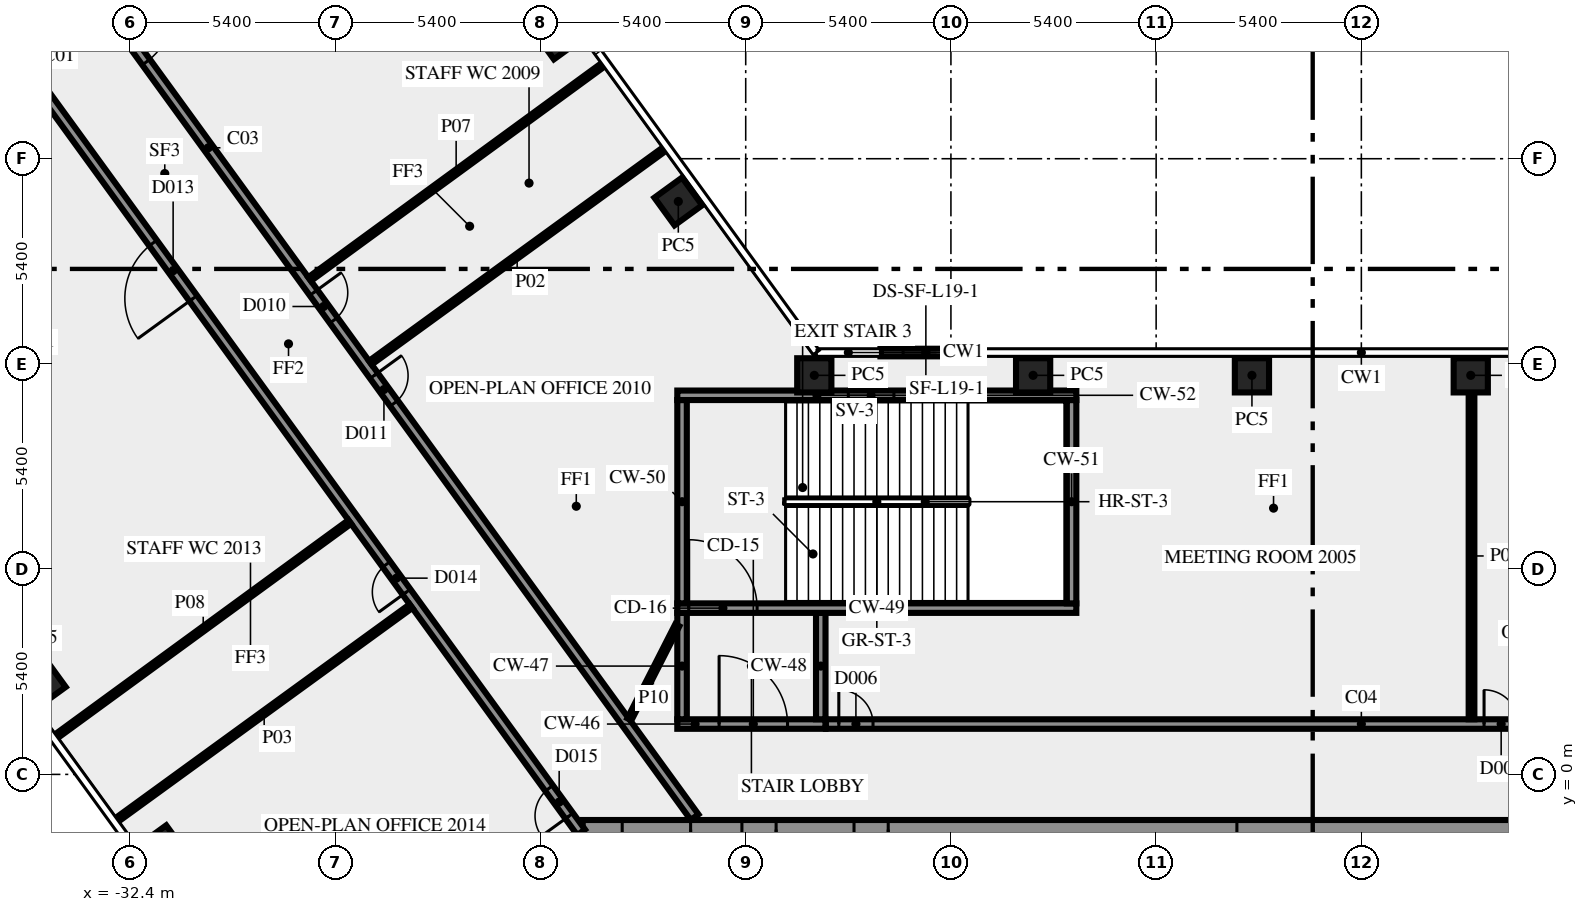
"""IFC4 building model, lengths in metres.
Left out: names, types, materials, properties, quantities, classifications, styles, units other than length and angle.
Written with IfcOpenShell. Run it as: python <this file> out.ifc"""

import sys

from ifc_helpers import new_model, si_unit, direction, frame, frame_2d, origin, origin_2d, place, context, subcontext, project, spatial, rectangle, extrude, element, fill, save


model = new_model("IFC4")
c1 = context("Model", 3, precision=1e-05, world=origin(), true_north=direction((0.0, 1.0)))
c2 = subcontext(c1, "Body", "Model", "MODEL_VIEW")
j1 = project(units=[si_unit("LENGTHUNIT", "METRE"), si_unit("PLANEANGLEUNIT", "RADIAN")], contexts=[c1])
p1 = place(None, origin())
s1 = spatial("IfcSite", under=j1, at=p1, CompositionType="ELEMENT")
p2 = place(p1, origin())
s2 = spatial("IfcBuilding", under=s1, at=p2, CompositionType="ELEMENT")
p3 = place(p2, frame((0.0, 0.0, 89.0)))
s3 = spatial("IfcBuildingStorey", under=s2, at=p3, CompositionType="ELEMENT", Elevation=89.0)
for number, where, z_axis, x_axis in (
    (1, (-17.974, 15.075, 0.0), (0.0, 0.0, 1.0), (-0.588, 0.809, 0.0)),
    (2, (-21.147, 19.444, 0.0), (0.0, 0.0, 1.0), (-0.588, 0.809, 0.0)),
    (3, (-34.722, 2.4, 0.0), (0.0, 0.0, 1.0), (0.588, -0.809, 0.0)),
    (4, (-31.548, -1.969, 0.0), (0.0, 0.0, 1.0), (0.588, -0.809, 0.0)),
    (5, (2.879, 10.5, 0.0), (0.0, 0.0, 1.0), (-1.0, 0.0, 0.0)),
    (6, (-2.879, 10.5, 0.0), (0.0, 0.0, 1.0), (-1.0, 0.0, 0.0)),
    (7, (-8.637, 10.5, 0.0), (0.0, 0.0, 1.0), (-1.0, 0.0, 0.0)),
    (8, (-14.395, 10.5, 0.0), (0.0, 0.0, 1.0), (-1.0, 0.0, 0.0)),
):
    element("IfcColumn", number, at=place(p3, frame(where, z_axis=z_axis, x_axis=x_axis)), inside=s3, PredefinedType="COLUMN", context=c2, shape_type="SweptSolid", body=[
        extrude(rectangle(XDim=0.9, YDim=0.9, at=origin_2d()), origin(), (0.0, 0.0, 1.0), 3.65),
    ])
p4 = place(p3, frame((-10.263, 11.1, 0.0), z_axis=(0.0, 0.0, 1.0), x_axis=(-1.0, 0.0, 0.0)))
e9 = element("IfcWall", 9, at=p4, inside=s3, PredefinedType="SOLIDWALL", context=c2, shape_type="SweptSolid", body=[
    extrude(rectangle(XDim=2.392, YDim=0.2, at=frame_2d((1.196, 0.0))), origin(), (0.0, 0.0, 1.0), 3.65),
])
p5 = place(p4, frame((0.596, 0.0, 1.0)))
e10 = element("IfcOpeningElement", 10, at=p5, cuts=e9, PredefinedType="OPENING", context=c2, shape_type="SweptSolid", body=[
    extrude(rectangle(XDim=1.2, YDim=1.2, at=frame_2d((0.6, 0.6))), frame((0.0, 0.11, 0.0), z_axis=(0.0, -1.0, 0.0), x_axis=(1.0, 0.0, 0.0)), (0.0, 0.0, 1.0), 0.22),
])
p6 = place(p3, frame((20.49, -1.45, 0.0), z_axis=(0.0, 0.0, 1.0), x_axis=(-1.0, 0.0, 0.0)))
e11 = element("IfcWall", 11, at=p6, inside=s3, PredefinedType="SHEAR", context=c2, shape_type="SweptSolid", body=[
    extrude(rectangle(XDim=40.98, YDim=0.5, at=frame_2d((20.49, 0.0))), origin(), (0.0, 0.0, 1.0), 3.65),
])
p7 = place(p6, frame((38.14, 0.0, 0.0)))
e12 = element("IfcOpeningElement", 12, at=p7, cuts=e11, PredefinedType="OPENING", context=c2, shape_type="SweptSolid", body=[
    extrude(rectangle(XDim=1.8, YDim=2.1, at=frame_2d((0.9, 1.05))), frame((0.0, 0.26, 0.0), z_axis=(0.0, -1.0, 0.0), x_axis=(1.0, 0.0, 0.0)), (0.0, 0.0, 1.0), 0.52),
])
p8 = place(p6, frame((35.89, 0.0, 0.0)))
e13 = element("IfcOpeningElement", 13, at=p8, cuts=e11, PredefinedType="OPENING", context=c2, shape_type="SweptSolid", body=[
    extrude(rectangle(XDim=0.9, YDim=2.1, at=frame_2d((0.45, 1.05))), frame((0.0, 0.26, 0.0), z_axis=(0.0, -1.0, 0.0), x_axis=(1.0, 0.0, 0.0)), (0.0, 0.0, 1.0), 0.52),
])
p9 = place(p6, frame((32.94, 0.0, 0.0)))
e14 = element("IfcOpeningElement", 14, at=p9, cuts=e11, PredefinedType="OPENING", context=c2, shape_type="SweptSolid", body=[
    extrude(rectangle(XDim=0.9, YDim=2.1, at=frame_2d((0.45, 1.05))), frame((0.0, 0.26, 0.0), z_axis=(0.0, -1.0, 0.0), x_axis=(1.0, 0.0, 0.0)), (0.0, 0.0, 1.0), 0.52),
])
p10 = place(p6, frame((21.765, 0.0, 0.0)))
e15 = element("IfcOpeningElement", 15, at=p10, cuts=e11, PredefinedType="OPENING", context=c2, shape_type="SweptSolid", body=[
    extrude(rectangle(XDim=2.0, YDim=2.1, at=frame_2d((1.0, 1.05))), frame((0.0, 0.26, 0.0), z_axis=(0.0, -1.0, 0.0), x_axis=(1.0, 0.0, 0.0)), (0.0, 0.0, 1.0), 0.52),
])
p11 = place(p6, frame((7.14, 0.0, 0.0)))
e16 = element("IfcOpeningElement", 16, at=p11, cuts=e11, PredefinedType="OPENING", context=c2, shape_type="SweptSolid", body=[
    extrude(rectangle(XDim=0.9, YDim=2.1, at=frame_2d((0.45, 1.05))), frame((0.0, 0.26, 0.0), z_axis=(0.0, -1.0, 0.0), x_axis=(1.0, 0.0, 0.0)), (0.0, 0.0, 1.0), 0.52),
])
p12 = place(p6, frame((5.028, 0.0, 0.0)))
e17 = element("IfcOpeningElement", 17, at=p12, cuts=e11, PredefinedType="OPENING", context=c2, shape_type="SweptSolid", body=[
    extrude(rectangle(XDim=0.8, YDim=2.1, at=frame_2d((0.4, 1.05))), frame((0.0, 0.26, 0.0), z_axis=(0.0, -1.0, 0.0), x_axis=(1.0, 0.0, 0.0)), (0.0, 0.0, 1.0), 0.52),
])
p13 = place(p6, frame((3.452, 0.0, 0.0)))
e18 = element("IfcOpeningElement", 18, at=p13, cuts=e11, PredefinedType="OPENING", context=c2, shape_type="SweptSolid", body=[
    extrude(rectangle(XDim=0.8, YDim=2.1, at=frame_2d((0.4, 1.05))), frame((0.0, 0.26, 0.0), z_axis=(0.0, -1.0, 0.0), x_axis=(1.0, 0.0, 0.0)), (0.0, 0.0, 1.0), 0.52),
])
p14 = place(p6, frame((1.04, 0.0, 0.0)))
e19 = element("IfcOpeningElement", 19, at=p14, cuts=e11, PredefinedType="OPENING", context=c2, shape_type="SweptSolid", body=[
    extrude(rectangle(XDim=1.8, YDim=2.1, at=frame_2d((0.9, 1.05))), frame((0.0, 0.26, 0.0), z_axis=(0.0, -1.0, 0.0), x_axis=(1.0, 0.0, 0.0)), (0.0, 0.0, 1.0), 0.52),
])
p15 = place(p3, frame((-18.0, 1.325, 0.0), z_axis=(0.0, 0.0, 1.0), x_axis=(1.0, 0.0, 0.0)))
e20 = element("IfcWall", 20, at=p15, inside=s3, PredefinedType="SHEAR", context=c2, shape_type="SweptSolid", body=[
    extrude(rectangle(XDim=3.9, YDim=0.25, at=frame_2d((1.95, 0.0))), origin(), (0.0, 0.0, 1.0), 3.65),
])
p16 = place(p15, frame((1.1, 0.0, 0.0)))
e21 = element("IfcOpeningElement", 21, at=p16, cuts=e20, PredefinedType="OPENING", context=c2, shape_type="SweptSolid", body=[
    extrude(rectangle(XDim=1.8, YDim=2.1, at=frame_2d((0.9, 1.05))), frame((0.0, 0.135, 0.0), z_axis=(0.0, -1.0, 0.0), x_axis=(1.0, 0.0, 0.0)), (0.0, 0.0, 1.0), 0.27),
])
for number, where, z_axis, x_axis in (
    (22, (-17.875, 1.45, 0.0), (0.0, 0.0, 1.0), (0.0, 1.0, 0.0)),
    (23, (-14.225, 1.45, 0.0), (0.0, 0.0, 1.0), (0.0, 1.0, 0.0)),
):
    element("IfcWall", number, at=place(p3, frame(where, z_axis=z_axis, x_axis=x_axis)), inside=s3, PredefinedType="SHEAR", context=c2, shape_type="SweptSolid", body=[
        extrude(rectangle(XDim=2.8, YDim=0.25, at=frame_2d((1.4, 0.0))), origin(), (0.0, 0.0, 1.0), 3.65),
    ])
p17 = place(p3, frame((-18.0, 4.375, 0.0), z_axis=(0.0, 0.0, 1.0), x_axis=(1.0, 0.0, 0.0)))
e24 = element("IfcWall", 24, at=p17, inside=s3, PredefinedType="SHEAR", context=c2, shape_type="SweptSolid", body=[
    extrude(rectangle(XDim=10.5, YDim=0.25, at=frame_2d((5.25, 0.0))), origin(), (0.0, 0.0, 1.0), 3.65),
])
p18 = place(p17, frame((0.3, 0.0, 0.0)))
e25 = element("IfcOpeningElement", 25, at=p18, cuts=e24, PredefinedType="OPENING", context=c2, shape_type="SweptSolid", body=[
    extrude(rectangle(XDim=1.8, YDim=2.1, at=frame_2d((0.9, 1.05))), frame((0.0, 0.135, 0.0), z_axis=(0.0, -1.0, 0.0), x_axis=(1.0, 0.0, 0.0)), (0.0, 0.0, 1.0), 0.27),
])
for number, where, z_axis, x_axis in (
    (26, (-17.875, 4.5, 0.0), (0.0, 0.0, 1.0), (0.0, 1.0, 0.0)),
    (27, (-7.625, 4.5, 0.0), (0.0, 0.0, 1.0), (0.0, 1.0, 0.0)),
):
    element("IfcWall", number, at=place(p3, frame(where, z_axis=z_axis, x_axis=x_axis)), inside=s3, PredefinedType="SHEAR", context=c2, shape_type="SweptSolid", body=[
        extrude(rectangle(XDim=5.35, YDim=0.25, at=frame_2d((2.675, 0.0))), origin(), (0.0, 0.0, 1.0), 3.65),
    ])
p19 = place(p3, frame((-18.0, 9.975, 0.0), z_axis=(0.0, 0.0, 1.0), x_axis=(1.0, 0.0, 0.0)))
e28 = element("IfcWall", 28, at=p19, inside=s3, PredefinedType="SHEAR", context=c2, shape_type="SweptSolid", body=[
    extrude(rectangle(XDim=10.5, YDim=0.25, at=frame_2d((5.25, 0.0))), origin(), (0.0, 0.0, 1.0), 3.65),
])
p20 = place(p19, frame((4.5, 0.0, 1.0)))
e29 = element("IfcOpeningElement", 29, at=p20, cuts=e28, PredefinedType="OPENING", context=c2, shape_type="SweptSolid", body=[
    extrude(rectangle(XDim=1.2, YDim=1.2, at=frame_2d((0.6, 0.6))), frame((0.0, 0.135, 0.0), z_axis=(0.0, -1.0, 0.0), x_axis=(1.0, 0.0, 0.0)), (0.0, 0.0, 1.0), 0.27),
])
p21 = place(p3, frame((-20.531, -1.523, 0.0), z_axis=(0.0, 0.0, 1.0), x_axis=(-0.587784522481, 0.809017524614, 0.0)))
e30 = element("IfcWall", 30, at=p21, inside=s3, PredefinedType="SOLIDWALL", context=c2, shape_type="SweptSolid", body=[
    extrude(rectangle(XDim=49.912, YDim=0.25, at=frame_2d((24.956, 0.0))), origin(), (0.0, 0.0, 1.0), 3.65),
])
p22 = place(p21, frame((0.533, 0.0, 0.0)))
e31 = element("IfcOpeningElement", 31, at=p22, cuts=e30, PredefinedType="OPENING", context=c2, shape_type="SweptSolid", body=[
    extrude(rectangle(XDim=0.9, YDim=2.1, at=frame_2d((0.45, 1.05))), frame((0.0, 0.135, 0.0), z_axis=(0.0, -1.0, 0.0), x_axis=(1.0, 0.0, 0.0)), (0.0, 0.0, 1.0), 0.27),
])
p23 = place(p21, frame((48.47, 0.0, 0.0)))
e32 = element("IfcOpeningElement", 32, at=p23, cuts=e30, PredefinedType="OPENING", context=c2, shape_type="SweptSolid", body=[
    extrude(rectangle(XDim=1.0, YDim=2.1, at=frame_2d((0.5, 1.05))), frame((0.0, 0.135, 0.0), z_axis=(0.0, -1.0, 0.0), x_axis=(1.0, 0.0, 0.0)), (0.0, 0.0, 1.0), 0.27),
])
p24 = place(p21, frame((17.365, 0.0, 0.0)))
e33 = element("IfcOpeningElement", 33, at=p24, cuts=e30, PredefinedType="OPENING", context=c2, shape_type="SweptSolid", body=[
    extrude(rectangle(XDim=1.8, YDim=2.1, at=frame_2d((0.9, 1.05))), frame((0.0, 0.135, 0.0), z_axis=(0.0, -1.0, 0.0), x_axis=(1.0, 0.0, 0.0)), (0.0, 0.0, 1.0), 0.27),
])
p25 = place(p21, frame((7.816, 0.0, 0.0)))
e34 = element("IfcOpeningElement", 34, at=p25, cuts=e30, PredefinedType="OPENING", context=c2, shape_type="SweptSolid", body=[
    extrude(rectangle(XDim=0.9, YDim=2.1, at=frame_2d((0.45, 1.05))), frame((0.0, 0.135, 0.0), z_axis=(0.0, -1.0, 0.0), x_axis=(1.0, 0.0, 0.0)), (0.0, 0.0, 1.0), 0.27),
])
p26 = place(p3, frame((-37.232, 25.972, 0.0), z_axis=(0.0, 0.0, 1.0), x_axis=(0.587786323093, -0.809016216391, 0.0)))
e35 = element("IfcWall", 35, at=p26, inside=s3, PredefinedType="SOLIDWALL", context=c2, shape_type="SweptSolid", body=[
    extrude(rectangle(XDim=33.493, YDim=0.25, at=frame_2d((16.747, 0.0))), origin(), (0.0, 0.0, 1.0), 3.65),
])
p27 = place(p26, frame((19.135, 0.0, 0.0)))
e36 = element("IfcOpeningElement", 36, at=p27, cuts=e35, PredefinedType="OPENING", context=c2, shape_type="SweptSolid", body=[
    extrude(rectangle(XDim=0.9, YDim=2.1, at=frame_2d((0.45, 1.05))), frame((0.0, 0.135, 0.0), z_axis=(0.0, -1.0, 0.0), x_axis=(1.0, 0.0, 0.0)), (0.0, 0.0, 1.0), 0.27),
])
p28 = place(p26, frame((7.137, 0.0, 0.0)))
e37 = element("IfcOpeningElement", 37, at=p28, cuts=e35, PredefinedType="OPENING", context=c2, shape_type="SweptSolid", body=[
    extrude(rectangle(XDim=1.8, YDim=2.1, at=frame_2d((0.9, 1.05))), frame((0.0, 0.135, 0.0), z_axis=(0.0, -1.0, 0.0), x_axis=(1.0, 0.0, 0.0)), (0.0, 0.0, 1.0), 0.27),
])
p29 = place(p26, frame((16.435, 0.0, 0.0)))
e38 = element("IfcOpeningElement", 38, at=p29, cuts=e35, PredefinedType="OPENING", context=c2, shape_type="SweptSolid", body=[
    extrude(rectangle(XDim=0.9, YDim=2.1, at=frame_2d((0.45, 1.05))), frame((0.0, 0.135, 0.0), z_axis=(0.0, -1.0, 0.0), x_axis=(1.0, 0.0, 0.0)), (0.0, 0.0, 1.0), 0.27),
])
p30 = place(p3, frame((-14.09, 1.325, 0.0), z_axis=(0.0, 0.0, 1.0), x_axis=(1.0, 0.0, 0.0)))
e39 = element("IfcWall", 39, at=p30, inside=s3, PredefinedType="SOLIDWALL", context=c2, shape_type="SweptSolid", body=[
    extrude(rectangle(XDim=28.18, YDim=0.25, at=frame_2d((14.09, 0.0))), origin(), (0.0, 0.0, 1.0), 3.65),
])
p31 = place(p30, frame((17.319, 0.0, 0.0)))
e40 = element("IfcOpeningElement", 40, at=p31, cuts=e39, PredefinedType="OPENING", context=c2, shape_type="SweptSolid", body=[
    extrude(rectangle(XDim=0.9, YDim=2.1, at=frame_2d((0.45, 1.05))), frame((0.0, 0.135, 0.0), z_axis=(0.0, -1.0, 0.0), x_axis=(1.0, 0.0, 0.0)), (0.0, 0.0, 1.0), 0.27),
])
p32 = place(p30, frame((0.34, 0.0, 0.0)))
e41 = element("IfcOpeningElement", 41, at=p32, cuts=e39, PredefinedType="OPENING", context=c2, shape_type="SweptSolid", body=[
    extrude(rectangle(XDim=0.9, YDim=2.1, at=frame_2d((0.45, 1.05))), frame((0.0, 0.135, 0.0), z_axis=(0.0, -1.0, 0.0), x_axis=(1.0, 0.0, 0.0)), (0.0, 0.0, 1.0), 0.27),
])
p33 = place(p3, frame((2.899, 10.045, 0.0), z_axis=(0.0, 0.0, 1.0), x_axis=(0.0, -1.0, 0.0)))
e42 = element("IfcWall", 42, at=p33, inside=s3, PredefinedType="PARTITIONING", context=c2, shape_type="SweptSolid", body=[
    extrude(rectangle(XDim=8.595, YDim=0.15, at=frame_2d((4.297, 0.0))), origin(), (0.0, 0.0, 1.0), 3.65),
])
p34 = place(p3, frame((-18.351, 16.445, 0.0), z_axis=(0.0, 0.0, 1.0), x_axis=(-0.809052142986, -0.587736871338, 0.0)))
e43 = element("IfcWall", 43, at=p34, inside=s3, PredefinedType="PARTITIONING", context=c2, shape_type="SweptSolid", body=[
    extrude(rectangle(XDim=9.55, YDim=0.12, at=frame_2d((4.775, 0.0))), origin(), (0.0, 0.0, 1.0), 2.75),
])
p35 = place(p3, frame((-25.008, 4.427, 0.0), z_axis=(0.0, 0.0, 1.0), x_axis=(-0.808994684961, -0.587815957341, 0.0)))
e44 = element("IfcWall", 44, at=p35, inside=s3, PredefinedType="PARTITIONING", context=c2, shape_type="SweptSolid", body=[
    extrude(rectangle(XDim=9.55, YDim=0.12, at=frame_2d((4.775, 0.0))), origin(), (0.0, 0.0, 1.0), 2.75),
])
for number, where, z_axis, x_axis in (
    (45, (-27.676, 13.032, 0.0), (0.0, 0.0, 1.0), (0.808, 0.59, 0.0)),
    (46, (-34.332, 1.011, 0.0), (0.0, 0.0, 1.0), (0.808, 0.59, 0.0)),
):
    element("IfcWall", number, at=place(p3, frame(where, z_axis=z_axis, x_axis=x_axis)), inside=s3, PredefinedType="PARTITIONING", context=c2, shape_type="SweptSolid", body=[
        extrude(rectangle(XDim=9.55, YDim=0.12, at=frame_2d((4.775, 0.0))), origin(), (0.0, 0.0, 1.0), 2.75),
    ])
p36 = place(p3, frame((-19.261, 1.45, 0.0), z_axis=(0.0, 0.0, 1.0), x_axis=(0.453950796792, 0.891026752736, 0.0)))
e47 = element("IfcWall", 47, at=p36, inside=s3, PredefinedType="PARTITIONING", context=c2, shape_type="SweptSolid", body=[
    extrude(rectangle(XDim=2.778, YDim=0.12, at=frame_2d((1.389, 0.0))), origin(), (0.0, 0.0, 1.0), 3.65),
])
p37 = place(p5, origin())
e48 = element("IfcWindow", 48, at=p37, inside=s3, PartitioningType="SINGLE_PANEL", PredefinedType="WINDOW", context=c2, shape_type="SweptSolid", body=[
    extrude(rectangle(XDim=1.2, YDim=1.2, at=frame_2d((0.6, 0.6))), frame((0.0, 0.03, 0.0), z_axis=(0.0, -1.0, 0.0), x_axis=(1.0, 0.0, 0.0)), (0.0, 0.0, 1.0), 0.06),
])
fill(e10, e48)
p38 = place(p7, origin())
e49 = element("IfcDoor", 49, at=p38, inside=s3, OperationType="DOUBLE_DOOR_SINGLE_SWING", PredefinedType="DOOR", context=c2, shape_type="SweptSolid", body=[
    extrude(rectangle(XDim=1.8, YDim=2.1, at=frame_2d((0.9, 1.05))), frame((0.0, 0.025, 0.0), z_axis=(0.0, -1.0, 0.0), x_axis=(1.0, 0.0, 0.0)), (0.0, 0.0, 1.0), 0.05),
])
fill(e12, e49)
p39 = place(p8, origin())
e50 = element("IfcDoor", 50, at=p39, inside=s3, OperationType="SINGLE_SWING_RIGHT", PredefinedType="DOOR", context=c2, shape_type="SweptSolid", body=[
    extrude(rectangle(XDim=0.9, YDim=2.1, at=frame_2d((0.45, 1.05))), frame((0.0, 0.025, 0.0), z_axis=(0.0, -1.0, 0.0), x_axis=(1.0, 0.0, 0.0)), (0.0, 0.0, 1.0), 0.05),
])
fill(e13, e50)
p40 = place(p9, origin())
e51 = element("IfcDoor", 51, at=p40, inside=s3, OperationType="SINGLE_SWING_RIGHT", PredefinedType="DOOR", context=c2, shape_type="SweptSolid", body=[
    extrude(rectangle(XDim=0.9, YDim=2.1, at=frame_2d((0.45, 1.05))), frame((0.0, 0.025, 0.0), z_axis=(0.0, -1.0, 0.0), x_axis=(1.0, 0.0, 0.0)), (0.0, 0.0, 1.0), 0.05),
])
fill(e14, e51)
p41 = place(p10, origin())
e52 = element("IfcDoor", 52, at=p41, inside=s3, OperationType="DOUBLE_DOOR_SINGLE_SWING", PredefinedType="DOOR", context=c2, shape_type="SweptSolid", body=[
    extrude(rectangle(XDim=2.0, YDim=2.1, at=frame_2d((1.0, 1.05))), frame((0.0, 0.025, 0.0), z_axis=(0.0, -1.0, 0.0), x_axis=(1.0, 0.0, 0.0)), (0.0, 0.0, 1.0), 0.05),
])
fill(e15, e52)
p42 = place(p16, origin())
e53 = element("IfcDoor", 53, at=p42, inside=s3, OperationType="DOUBLE_DOOR_SINGLE_SWING", PredefinedType="DOOR", context=c2, shape_type="SweptSolid", body=[
    extrude(rectangle(XDim=1.8, YDim=2.1, at=frame_2d((0.9, 1.05))), frame((0.0, 0.025, 0.0), z_axis=(0.0, -1.0, 0.0), x_axis=(1.0, 0.0, 0.0)), (0.0, 0.0, 1.0), 0.05),
])
fill(e21, e53)
p43 = place(p18, origin())
e54 = element("IfcDoor", 54, at=p43, inside=s3, OperationType="DOUBLE_DOOR_SINGLE_SWING", PredefinedType="DOOR", context=c2, shape_type="SweptSolid", body=[
    extrude(rectangle(XDim=1.8, YDim=2.1, at=frame_2d((0.9, 1.05))), frame((0.0, 0.025, 0.0), z_axis=(0.0, -1.0, 0.0), x_axis=(1.0, 0.0, 0.0)), (0.0, 0.0, 1.0), 0.05),
])
fill(e25, e54)
p44 = place(p20, origin())
e55 = element("IfcWindow", 55, at=p44, inside=s3, PartitioningType="SINGLE_PANEL", PredefinedType="WINDOW", context=c2, shape_type="SweptSolid", body=[
    extrude(rectangle(XDim=1.2, YDim=1.2, at=frame_2d((0.6, 0.6))), frame((0.0, 0.03, 0.0), z_axis=(0.0, -1.0, 0.0), x_axis=(1.0, 0.0, 0.0)), (0.0, 0.0, 1.0), 0.06),
])
fill(e29, e55)
p45 = place(p31, origin())
e56 = element("IfcDoor", 56, at=p45, inside=s3, OperationType="SINGLE_SWING_LEFT", PredefinedType="DOOR", context=c2, shape_type="SweptSolid", body=[
    extrude(rectangle(XDim=0.9, YDim=2.1, at=frame_2d((0.45, 1.05))), frame((0.0, 0.025, 0.0), z_axis=(0.0, -1.0, 0.0), x_axis=(1.0, 0.0, 0.0)), (0.0, 0.0, 1.0), 0.05),
])
fill(e40, e56)
p46 = place(p27, origin())
e57 = element("IfcDoor", 57, at=p46, inside=s3, OperationType="SINGLE_SWING_LEFT", PredefinedType="DOOR", context=c2, shape_type="SweptSolid", body=[
    extrude(rectangle(XDim=0.9, YDim=2.1, at=frame_2d((0.45, 1.05))), frame((0.0, 0.025, 0.0), z_axis=(0.0, -1.0, 0.0), x_axis=(1.0, 0.0, 0.0)), (0.0, 0.0, 1.0), 0.05),
])
fill(e36, e57)
p47 = place(p22, origin())
e58 = element("IfcDoor", 58, at=p47, inside=s3, OperationType="SINGLE_SWING_LEFT", PredefinedType="DOOR", context=c2, shape_type="SweptSolid", body=[
    extrude(rectangle(XDim=0.9, YDim=2.1, at=frame_2d((0.45, 1.05))), frame((0.0, 0.025, 0.0), z_axis=(0.0, -1.0, 0.0), x_axis=(1.0, 0.0, 0.0)), (0.0, 0.0, 1.0), 0.05),
])
fill(e31, e58)
p48 = place(p32, origin())
e59 = element("IfcDoor", 59, at=p48, inside=s3, OperationType="SINGLE_SWING_LEFT", PredefinedType="DOOR", context=c2, shape_type="SweptSolid", body=[
    extrude(rectangle(XDim=0.9, YDim=2.1, at=frame_2d((0.45, 1.05))), frame((0.0, 0.025, 0.0), z_axis=(0.0, -1.0, 0.0), x_axis=(1.0, 0.0, 0.0)), (0.0, 0.0, 1.0), 0.05),
])
fill(e41, e59)
p49 = place(p28, origin())
e60 = element("IfcDoor", 60, at=p49, inside=s3, OperationType="DOUBLE_DOOR_SINGLE_SWING", PredefinedType="DOOR", context=c2, shape_type="SweptSolid", body=[
    extrude(rectangle(XDim=1.8, YDim=2.1, at=frame_2d((0.9, 1.05))), frame((0.0, 0.025, 0.0), z_axis=(0.0, -1.0, 0.0), x_axis=(1.0, 0.0, 0.0)), (0.0, 0.0, 1.0), 0.05),
])
fill(e37, e60)
p50 = place(p24, origin())
e61 = element("IfcDoor", 61, at=p50, inside=s3, OperationType="DOUBLE_DOOR_SINGLE_SWING", PredefinedType="DOOR", context=c2, shape_type="SweptSolid", body=[
    extrude(rectangle(XDim=1.8, YDim=2.1, at=frame_2d((0.9, 1.05))), frame((0.0, 0.025, 0.0), z_axis=(0.0, -1.0, 0.0), x_axis=(1.0, 0.0, 0.0)), (0.0, 0.0, 1.0), 0.05),
])
fill(e33, e61)
p51 = place(p29, origin())
e62 = element("IfcDoor", 62, at=p51, inside=s3, OperationType="SINGLE_SWING_LEFT", PredefinedType="DOOR", context=c2, shape_type="SweptSolid", body=[
    extrude(rectangle(XDim=0.9, YDim=2.1, at=frame_2d((0.45, 1.05))), frame((0.0, 0.025, 0.0), z_axis=(0.0, -1.0, 0.0), x_axis=(1.0, 0.0, 0.0)), (0.0, 0.0, 1.0), 0.05),
])
fill(e38, e62)
p52 = place(p25, origin())
e63 = element("IfcDoor", 63, at=p52, inside=s3, OperationType="SINGLE_SWING_LEFT", PredefinedType="DOOR", context=c2, shape_type="SweptSolid", body=[
    extrude(rectangle(XDim=0.9, YDim=2.1, at=frame_2d((0.45, 1.05))), frame((0.0, 0.025, 0.0), z_axis=(0.0, -1.0, 0.0), x_axis=(1.0, 0.0, 0.0)), (0.0, 0.0, 1.0), 0.05),
])
fill(e34, e63)
save(model, sys.argv[1])
